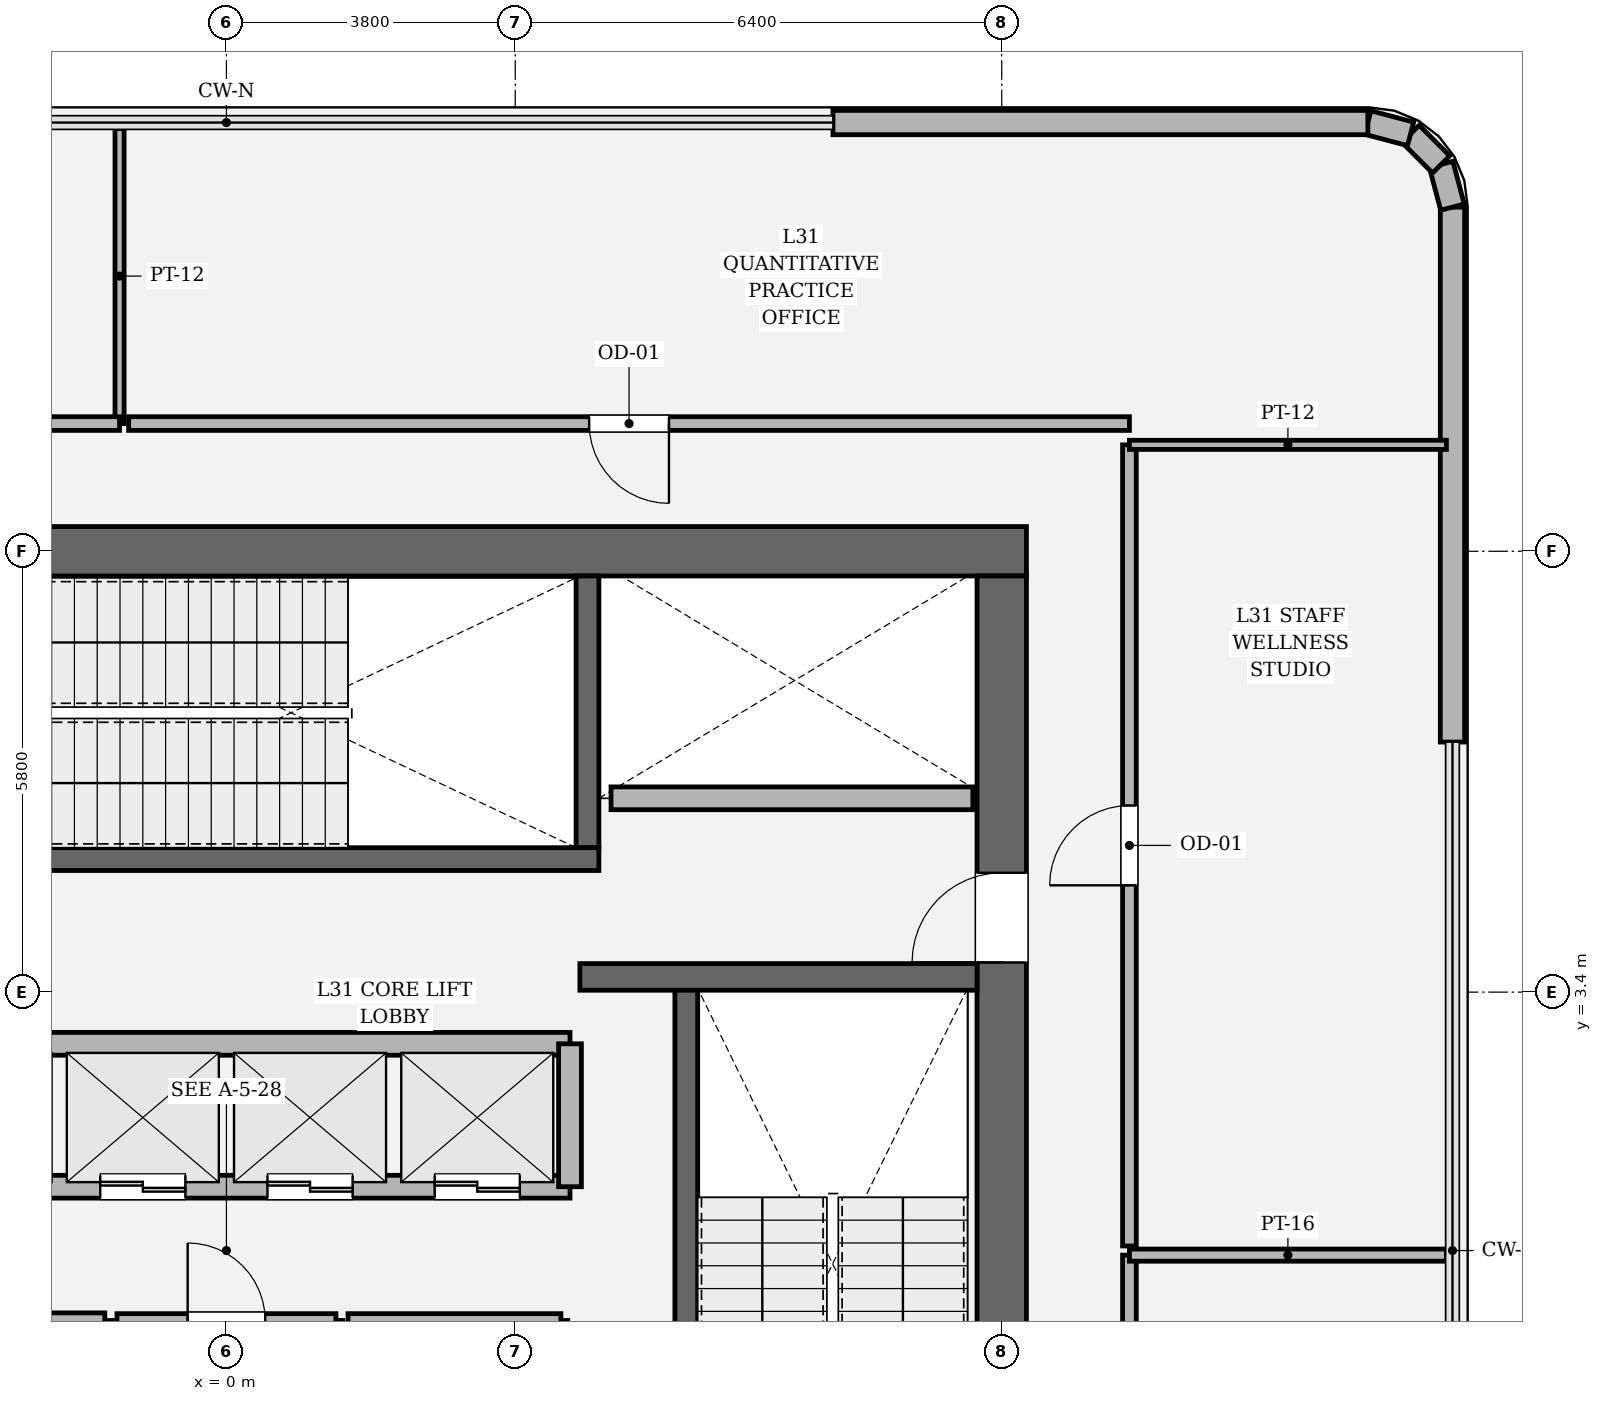
"""IFC4 building model, lengths in metres.
Left out: names, types, materials, properties, quantities, classifications, styles, units other than length and angle.
Written with IfcOpenShell. Run it as: python <this file> out.ifc"""

import sys

from ifc_helpers import new_model, si_unit, direction, frame, frame_2d, origin, place, context, subcontext, project, spatial, rectangle, extrude, element, fill, save


model = new_model("IFC4")
c1 = context("Model", 3, precision=1e-05, world=origin(), true_north=direction((0.0, 1.0)))
c2 = subcontext(c1, "Body", "Model", "MODEL_VIEW")
j1 = project(units=[si_unit("LENGTHUNIT", "METRE"), si_unit("PLANEANGLEUNIT", "RADIAN")], contexts=[c1])
p1 = place(None, origin())
s1 = spatial("IfcSite", under=j1, at=p1, CompositionType="ELEMENT")
p2 = place(p1, origin())
s2 = spatial("IfcBuilding", under=s1, at=p2, CompositionType="ELEMENT")
p3 = place(p2, frame((0.0, 0.0, 135.0)))
s3 = spatial("IfcBuildingStorey", under=s2, at=p3, CompositionType="ELEMENT", Elevation=135.0)
p4 = place(p3, frame((-10.525, 9.2, 0.0), z_axis=(0.0, 0.0, 1.0), x_axis=(1.0, 0.0, 0.0)))
e1 = element("IfcWall", 1, at=p4, inside=s3, PredefinedType="SHEAR", context=c2, shape_type="SweptSolid", body=[
    extrude(rectangle(XDim=21.05, YDim=0.65, at=frame_2d((10.525, 0.0))), origin(), (0.0, 0.0, 1.0), 4.8),
])
p5 = place(p3, frame((10.2, 8.875, 0.0), z_axis=(0.0, 0.0, 1.0), x_axis=(0.0, -1.0, 0.0)))
e2 = element("IfcWall", 2, at=p5, inside=s3, PredefinedType="SHEAR", context=c2, shape_type="SweptSolid", body=[
    extrude(rectangle(XDim=17.75, YDim=0.65, at=frame_2d((8.875, 0.0))), origin(), (0.0, 0.0, 1.0), 4.8),
])
p6 = place(p5, frame((3.905, 0.0, 0.0)))
e3 = element("IfcOpeningElement", 3, at=p6, cuts=e2, PredefinedType="OPENING", context=c2, shape_type="SweptSolid", body=[
    extrude(rectangle(XDim=1.18, YDim=2.2, at=frame_2d((0.59, 1.1))), frame((0.0, 0.335, 0.0), z_axis=(0.0, -1.0, 0.0), x_axis=(1.0, 0.0, 0.0)), (0.0, 0.0, 1.0), 0.67),
])
p7 = place(p3, frame((6.05, 3.45, 0.0), z_axis=(0.0, 0.0, 1.0), x_axis=(0.0, -1.0, 0.0)))
e4 = element("IfcWall", 4, at=p7, inside=s3, PredefinedType="SOLIDWALL", context=c2, shape_type="SweptSolid", body=[
    extrude(rectangle(XDim=8.95, YDim=0.3, at=frame_2d((4.475, 0.0))), origin(), (0.0, 0.0, 1.0), 4.8),
])
p8 = place(p3, frame((4.75, 8.875, 0.0), z_axis=(0.0, 0.0, 1.0), x_axis=(0.0, -1.0, 0.0)))
e5 = element("IfcWall", 5, at=p8, inside=s3, PredefinedType="SOLIDWALL", context=c2, shape_type="SweptSolid", body=[
    extrude(rectangle(XDim=3.575, YDim=0.3, at=frame_2d((1.788, 0.0))), origin(), (0.0, 0.0, 1.0), 4.8),
])
p9 = place(p3, frame((-4.9, 5.15, 0.0), z_axis=(0.0, 0.0, 1.0), x_axis=(1.0, 0.0, 0.0)))
e6 = element("IfcWall", 6, at=p9, inside=s3, PredefinedType="SOLIDWALL", context=c2, shape_type="SweptSolid", body=[
    extrude(rectangle(XDim=9.8, YDim=0.3, at=frame_2d((4.9, 0.0))), origin(), (0.0, 0.0, 1.0), 4.8),
])
p10 = place(p9, frame((0.56, 0.0, 0.0)))
e7 = element("IfcOpeningElement", 7, at=p10, cuts=e6, PredefinedType="OPENING", context=c2, shape_type="SweptSolid", body=[
    extrude(rectangle(XDim=1.18, YDim=2.2, at=frame_2d((0.59, 1.1))), frame((0.0, 0.16, 0.0), z_axis=(0.0, -1.0, 0.0), x_axis=(1.0, 0.0, 0.0)), (0.0, 0.0, 1.0), 0.32),
])
p11 = place(p3, frame((4.65, 3.6, 0.0), z_axis=(0.0, 0.0, 1.0), x_axis=(1.0, 0.0, 0.0)))
e8 = element("IfcWall", 8, at=p11, inside=s3, PredefinedType="SOLIDWALL", context=c2, shape_type="SweptSolid", body=[
    extrude(rectangle(XDim=5.225, YDim=0.35, at=frame_2d((2.613, 0.0))), origin(), (0.0, 0.0, 1.0), 4.8),
])
p12 = place(p3, frame((16.13, 6.69, 0.0), z_axis=(0.0, 0.0, 1.0), x_axis=(0.0, 1.0, 0.0)))
e9 = element("IfcWall", 9, at=p12, inside=s3, PredefinedType="SOLIDWALL", context=c2, shape_type="SweptSolid", body=[
    extrude(rectangle(XDim=7.037, YDim=0.32, at=frame_2d((3.519, 0.0))), origin(), (0.0, 0.0, 1.0), 3.194),
])
p13 = place(p3, frame((16.13, 13.727, 0.0), z_axis=(0.0, 0.0, 1.0), x_axis=(-0.255650250031, 0.966769336325, 0.0)))
e10 = element("IfcWall", 10, at=p13, inside=s3, PredefinedType="SOLIDWALL", context=c2, shape_type="SweptSolid", body=[
    extrude(rectangle(XDim=0.582, YDim=0.32, at=frame_2d((0.291, 0.0))), origin(), (0.0, 0.0, 1.0), 4.52),
])
p14 = place(p3, frame((15.981, 14.289, 0.0), z_axis=(0.0, 0.0, 1.0), x_axis=(-0.707106781187, 0.707106781187, 0.0)))
e11 = element("IfcWall", 11, at=p14, inside=s3, PredefinedType="SOLIDWALL", context=c2, shape_type="SweptSolid", body=[
    extrude(rectangle(XDim=0.569, YDim=0.32, at=frame_2d((0.284, 0.0))), origin(), (0.0, 0.0, 1.0), 4.52),
])
p15 = place(p3, frame((15.579, 14.691, 0.0), z_axis=(0.0, 0.0, 1.0), x_axis=(-0.966665515501, 0.256042537758, 0.0)))
e12 = element("IfcWall", 12, at=p15, inside=s3, PredefinedType="SOLIDWALL", context=c2, shape_type="SweptSolid", body=[
    extrude(rectangle(XDim=0.582, YDim=0.32, at=frame_2d((0.291, 0.0))), origin(), (0.0, 0.0, 1.0), 4.52),
])
p16 = place(p3, frame((15.017, 14.84, 0.0), z_axis=(0.0, 0.0, 1.0), x_axis=(-1.0, 0.0, 0.0)))
e13 = element("IfcWall", 13, at=p16, inside=s3, PredefinedType="SOLIDWALL", context=c2, shape_type="SweptSolid", body=[
    extrude(rectangle(XDim=7.037, YDim=0.32, at=frame_2d((3.519, 0.0))), origin(), (0.0, 0.0, 1.0), 3.194),
])
p17 = place(p3, frame((-4.52, 0.84, 0.0), z_axis=(0.0, 0.0, 1.0), x_axis=(1.0, 0.0, 0.0)))
e14 = element("IfcWall", 14, at=p17, inside=s3, PredefinedType="SOLIDWALL", context=c2, shape_type="SweptSolid", body=[
    extrude(rectangle(XDim=9.04, YDim=0.3, at=frame_2d((4.52, 0.0))), origin(), (0.0, 0.0, 1.0), 4.52),
])
p18 = place(p17, frame((0.66, 0.0, 0.0)))
e15 = element("IfcOpeningElement", 15, at=p18, cuts=e14, PredefinedType="OPENING", context=c2, shape_type="SweptSolid", body=[
    extrude(rectangle(XDim=1.12, YDim=2.25, at=frame_2d((0.56, 1.125))), frame((0.0, 0.16, 0.0), z_axis=(0.0, -1.0, 0.0), x_axis=(1.0, 0.0, 0.0)), (0.0, 0.0, 1.0), 0.32),
])
p19 = place(p17, frame((2.86, 0.0, 0.0)))
e16 = element("IfcOpeningElement", 16, at=p19, cuts=e14, PredefinedType="OPENING", context=c2, shape_type="SweptSolid", body=[
    extrude(rectangle(XDim=1.12, YDim=2.25, at=frame_2d((0.56, 1.125))), frame((0.0, 0.16, 0.0), z_axis=(0.0, -1.0, 0.0), x_axis=(1.0, 0.0, 0.0)), (0.0, 0.0, 1.0), 0.32),
])
p20 = place(p17, frame((5.06, 0.0, 0.0)))
e17 = element("IfcOpeningElement", 17, at=p20, cuts=e14, PredefinedType="OPENING", context=c2, shape_type="SweptSolid", body=[
    extrude(rectangle(XDim=1.12, YDim=2.25, at=frame_2d((0.56, 1.125))), frame((0.0, 0.16, 0.0), z_axis=(0.0, -1.0, 0.0), x_axis=(1.0, 0.0, 0.0)), (0.0, 0.0, 1.0), 0.32),
])
p21 = place(p17, frame((7.26, 0.0, 0.0)))
e18 = element("IfcOpeningElement", 18, at=p21, cuts=e14, PredefinedType="OPENING", context=c2, shape_type="SweptSolid", body=[
    extrude(rectangle(XDim=1.12, YDim=2.25, at=frame_2d((0.56, 1.125))), frame((0.0, 0.16, 0.0), z_axis=(0.0, -1.0, 0.0), x_axis=(1.0, 0.0, 0.0)), (0.0, 0.0, 1.0), 0.32),
])
p22 = place(p3, frame((-4.52, 2.72, 0.0), z_axis=(0.0, 0.0, 1.0), x_axis=(1.0, 0.0, 0.0)))
e19 = element("IfcWall", 19, at=p22, inside=s3, PredefinedType="SOLIDWALL", context=c2, shape_type="SweptSolid", body=[
    extrude(rectangle(XDim=9.04, YDim=0.3, at=frame_2d((4.52, 0.0))), origin(), (0.0, 0.0, 1.0), 4.52),
])
p23 = place(p3, frame((4.52, 0.84, 0.0), z_axis=(0.0, 0.0, 1.0), x_axis=(0.0, 1.0, 0.0)))
e20 = element("IfcWall", 20, at=p23, inside=s3, PredefinedType="SOLIDWALL", context=c2, shape_type="SweptSolid", body=[
    extrude(rectangle(XDim=1.88, YDim=0.3, at=frame_2d((0.94, 0.0))), origin(), (0.0, 0.0, 1.0), 4.52),
])
p24 = place(p3, frame((5.06, 5.95, 0.0), z_axis=(0.0, 0.0, 1.0), x_axis=(1.0, 0.0, 0.0)))
e21 = element("IfcWall", 21, at=p24, inside=s3, PredefinedType="SOLIDWALL", context=c2, shape_type="SweptSolid", body=[
    extrude(rectangle(XDim=4.76, YDim=0.3, at=frame_2d((2.38, 0.0))), origin(), (0.0, 0.0, 1.0), 4.52),
])
p25 = place(p3, frame((-1.6, -2.68, 0.0), z_axis=(0.0, 0.0, 1.0), x_axis=(0.0, 1.0, 0.0)))
e22 = element("IfcWall", 22, at=p25, inside=s3, PredefinedType="SOLIDWALL", context=c2, shape_type="SweptSolid", body=[
    extrude(rectangle(XDim=1.76, YDim=0.2, at=frame_2d((0.88, 0.0))), origin(), (0.0, 0.0, 1.0), 4.52),
])
p26 = place(p3, frame((-1.6, -0.92, 0.0), z_axis=(0.0, 0.0, 1.0), x_axis=(-1.0, 0.0, 0.0)))
e23 = element("IfcWall", 23, at=p26, inside=s3, PredefinedType="SOLIDWALL", context=c2, shape_type="SweptSolid", body=[
    extrude(rectangle(XDim=2.8, YDim=0.2, at=frame_2d((1.4, 0.0))), origin(), (0.0, 0.0, 1.0), 4.52),
])
p27 = place(p26, frame((0.94, 0.0, 0.0)))
e24 = element("IfcOpeningElement", 24, at=p27, cuts=e23, PredefinedType="OPENING", context=c2, shape_type="SweptSolid", body=[
    extrude(rectangle(XDim=0.92, YDim=2.1, at=frame_2d((0.46, 1.05))), frame((0.0, 0.11, 0.0), z_axis=(0.0, -1.0, 0.0), x_axis=(1.0, 0.0, 0.0)), (0.0, 0.0, 1.0), 0.22),
])
p28 = place(p3, frame((1.44, -2.68, 0.0), z_axis=(0.0, 0.0, 1.0), x_axis=(0.0, 1.0, 0.0)))
e25 = element("IfcWall", 25, at=p28, inside=s3, PredefinedType="PARTITIONING", context=c2, shape_type="SweptSolid", body=[
    extrude(rectangle(XDim=1.76, YDim=0.18, at=frame_2d((0.88, 0.0))), origin(), (0.0, 0.0, 1.0), 4.52),
])
p29 = place(p3, frame((1.44, -0.92, 0.0), z_axis=(0.0, 0.0, 1.0), x_axis=(-1.0, 0.0, 0.0)))
e26 = element("IfcWall", 26, at=p29, inside=s3, PredefinedType="PARTITIONING", context=c2, shape_type="SweptSolid", body=[
    extrude(rectangle(XDim=2.88, YDim=0.18, at=frame_2d((1.44, 0.0))), origin(), (0.0, 0.0, 1.0), 4.52),
])
p30 = place(p29, frame((0.93, 0.0, 0.0)))
e27 = element("IfcOpeningElement", 27, at=p30, cuts=e26, PredefinedType="OPENING", context=c2, shape_type="SweptSolid", body=[
    extrude(rectangle(XDim=1.02, YDim=2.2, at=frame_2d((0.51, 1.1))), frame((0.0, 0.1, 0.0), z_axis=(0.0, -1.0, 0.0), x_axis=(1.0, 0.0, 0.0)), (0.0, 0.0, 1.0), 0.2),
])
p31 = place(p3, frame((4.4, -2.68, 0.0), z_axis=(0.0, 0.0, 1.0), x_axis=(0.0, 1.0, 0.0)))
e28 = element("IfcWall", 28, at=p31, inside=s3, PredefinedType="PARTITIONING", context=c2, shape_type="SweptSolid", body=[
    extrude(rectangle(XDim=1.76, YDim=0.18, at=frame_2d((0.88, 0.0))), origin(), (0.0, 0.0, 1.0), 4.52),
])
p32 = place(p31, frame((0.355, 0.0, 0.0)))
e29 = element("IfcOpeningElement", 29, at=p32, cuts=e28, PredefinedType="OPENING", context=c2, shape_type="SweptSolid", body=[
    extrude(rectangle(XDim=1.05, YDim=2.2, at=frame_2d((0.525, 1.1))), frame((0.0, 0.1, 0.0), z_axis=(0.0, -1.0, 0.0), x_axis=(1.0, 0.0, 0.0)), (0.0, 0.0, 1.0), 0.2),
])
p33 = place(p3, frame((4.4, -0.92, 0.0), z_axis=(0.0, 0.0, 1.0), x_axis=(-1.0, 0.0, 0.0)))
e30 = element("IfcWall", 30, at=p33, inside=s3, PredefinedType="PARTITIONING", context=c2, shape_type="SweptSolid", body=[
    extrude(rectangle(XDim=2.8, YDim=0.18, at=frame_2d((1.4, 0.0))), origin(), (0.0, 0.0, 1.0), 4.52),
])
p34 = place(p3, frame((11.88, -10.6, 0.0), z_axis=(0.0, 0.0, 1.0), x_axis=(0.0, 1.0, 0.0)))
e31 = element("IfcWall", 31, at=p34, inside=s3, PredefinedType="PARTITIONING", context=c2, shape_type="SweptSolid", body=[
    extrude(rectangle(XDim=10.54, YDim=0.18, at=frame_2d((5.27, 0.0))), origin(), (0.0, 0.0, 1.0), 3.194),
])
p35 = place(p34, frame((4.745, 0.0, 0.0)))
e32 = element("IfcOpeningElement", 32, at=p35, cuts=e31, PredefinedType="OPENING", context=c2, shape_type="SweptSolid", body=[
    extrude(rectangle(XDim=1.05, YDim=2.2, at=frame_2d((0.525, 1.1))), frame((0.0, 0.1, 0.0), z_axis=(0.0, -1.0, 0.0), x_axis=(1.0, 0.0, 0.0)), (0.0, 0.0, 1.0), 0.2),
])
p36 = place(p3, frame((11.88, -0.06, 0.0), z_axis=(0.0, 0.0, 1.0), x_axis=(1.0, 0.0, 0.0)))
e33 = element("IfcWall", 33, at=p36, inside=s3, PredefinedType="PARTITIONING", context=c2, shape_type="SweptSolid", body=[
    extrude(rectangle(XDim=4.17, YDim=0.16, at=frame_2d((2.085, 0.0))), origin(), (0.0, 0.0, 1.0), 4.52),
])
p37 = place(p3, frame((11.88, 0.06, 0.0), z_axis=(0.0, 0.0, 1.0), x_axis=(0.0, 1.0, 0.0)))
e34 = element("IfcWall", 34, at=p37, inside=s3, PredefinedType="PARTITIONING", context=c2, shape_type="SweptSolid", body=[
    extrude(rectangle(XDim=10.54, YDim=0.18, at=frame_2d((5.27, 0.0))), origin(), (0.0, 0.0, 1.0), 3.194),
])
p38 = place(p37, frame((4.745, 0.0, 0.0)))
e35 = element("IfcOpeningElement", 35, at=p38, cuts=e34, PredefinedType="OPENING", context=c2, shape_type="SweptSolid", body=[
    extrude(rectangle(XDim=1.05, YDim=2.2, at=frame_2d((0.525, 1.1))), frame((0.0, 0.1, 0.0), z_axis=(0.0, -1.0, 0.0), x_axis=(1.0, 0.0, 0.0)), (0.0, 0.0, 1.0), 0.2),
])
p39 = place(p3, frame((11.88, 10.6, 0.0), z_axis=(0.0, 0.0, 1.0), x_axis=(1.0, 0.0, 0.0)))
e36 = element("IfcWall", 36, at=p39, inside=s3, PredefinedType="PARTITIONING", context=c2, shape_type="SweptSolid", body=[
    extrude(rectangle(XDim=4.17, YDim=0.12, at=frame_2d((2.085, 0.0))), origin(), (0.0, 0.0, 1.0), 4.114),
])
p40 = place(p3, frame((-1.406, 14.76, 0.0), z_axis=(0.0, 0.0, 1.0), x_axis=(0.0, -1.0, 0.0)))
e37 = element("IfcWall", 37, at=p40, inside=s3, PredefinedType="PARTITIONING", context=c2, shape_type="SweptSolid", body=[
    extrude(rectangle(XDim=3.88, YDim=0.12, at=frame_2d((1.94, 0.0))), origin(), (0.0, 0.0, 1.0), 4.52),
])
p41 = place(p3, frame((-1.406, 10.88, 0.0), z_axis=(0.0, 0.0, 1.0), x_axis=(-1.0, 0.0, 0.0)))
e38 = element("IfcWall", 38, at=p41, inside=s3, PredefinedType="PARTITIONING", context=c2, shape_type="SweptSolid", body=[
    extrude(rectangle(XDim=10.474, YDim=0.18, at=frame_2d((5.237, 0.0))), origin(), (0.0, 0.0, 1.0), 3.194),
])
p42 = place(p41, frame((4.712, 0.0, 0.0)))
e39 = element("IfcOpeningElement", 39, at=p42, cuts=e38, PredefinedType="OPENING", context=c2, shape_type="SweptSolid", body=[
    extrude(rectangle(XDim=1.05, YDim=2.2, at=frame_2d((0.525, 1.1))), frame((0.0, 0.1, 0.0), z_axis=(0.0, -1.0, 0.0), x_axis=(1.0, 0.0, 0.0)), (0.0, 0.0, 1.0), 0.2),
])
p43 = place(p3, frame((11.88, 10.88, 0.0), z_axis=(0.0, 0.0, 1.0), x_axis=(-1.0, 0.0, 0.0)))
e40 = element("IfcWall", 40, at=p43, inside=s3, PredefinedType="PARTITIONING", context=c2, shape_type="SweptSolid", body=[
    extrude(rectangle(XDim=13.166, YDim=0.18, at=frame_2d((6.583, 0.0))), origin(), (0.0, 0.0, 1.0), 3.194),
])
p44 = place(p43, frame((6.058, 0.0, 0.0)))
e41 = element("IfcOpeningElement", 41, at=p44, cuts=e40, PredefinedType="OPENING", context=c2, shape_type="SweptSolid", body=[
    extrude(rectangle(XDim=1.05, YDim=2.2, at=frame_2d((0.525, 1.1))), frame((0.0, 0.1, 0.0), z_axis=(0.0, -1.0, 0.0), x_axis=(1.0, 0.0, 0.0)), (0.0, 0.0, 1.0), 0.2),
])
p45 = place(p6, origin())
e42 = element("IfcDoor", 42, at=p45, inside=s3, OperationType="SINGLE_SWING_RIGHT", PredefinedType="DOOR", context=c2, shape_type="SweptSolid", body=[
    extrude(rectangle(XDim=1.18, YDim=2.2, at=frame_2d((0.59, 1.1))), frame((0.0, 0.025, 0.0), z_axis=(0.0, -1.0, 0.0), x_axis=(1.0, 0.0, 0.0)), (0.0, 0.0, 1.0), 0.05),
])
fill(e3, e42)
p46 = place(p19, origin())
e43 = element("IfcDoor", 43, at=p46, inside=s3, OperationType="DOUBLE_DOOR_SLIDING", PredefinedType="DOOR", context=c2, shape_type="SweptSolid", body=[
    extrude(rectangle(XDim=1.12, YDim=2.25, at=frame_2d((0.56, 1.125))), frame((0.0, 0.025, 0.0), z_axis=(0.0, -1.0, 0.0), x_axis=(1.0, 0.0, 0.0)), (0.0, 0.0, 1.0), 0.05),
])
fill(e16, e43)
p47 = place(p20, origin())
e44 = element("IfcDoor", 44, at=p47, inside=s3, OperationType="DOUBLE_DOOR_SLIDING", PredefinedType="DOOR", context=c2, shape_type="SweptSolid", body=[
    extrude(rectangle(XDim=1.12, YDim=2.25, at=frame_2d((0.56, 1.125))), frame((0.0, 0.025, 0.0), z_axis=(0.0, -1.0, 0.0), x_axis=(1.0, 0.0, 0.0)), (0.0, 0.0, 1.0), 0.05),
])
fill(e17, e44)
p48 = place(p21, origin())
e45 = element("IfcDoor", 45, at=p48, inside=s3, OperationType="DOUBLE_DOOR_SLIDING", PredefinedType="DOOR", context=c2, shape_type="SweptSolid", body=[
    extrude(rectangle(XDim=1.12, YDim=2.25, at=frame_2d((0.56, 1.125))), frame((0.0, 0.025, 0.0), z_axis=(0.0, -1.0, 0.0), x_axis=(1.0, 0.0, 0.0)), (0.0, 0.0, 1.0), 0.05),
])
fill(e18, e45)
p49 = place(p30, origin())
e46 = element("IfcDoor", 46, at=p49, inside=s3, OperationType="SINGLE_SWING_RIGHT", PredefinedType="DOOR", context=c2, shape_type="SweptSolid", body=[
    extrude(rectangle(XDim=1.02, YDim=2.2, at=frame_2d((0.51, 1.1))), frame((0.0, 0.025, 0.0), z_axis=(0.0, -1.0, 0.0), x_axis=(1.0, 0.0, 0.0)), (0.0, 0.0, 1.0), 0.05),
])
fill(e27, e46)
p50 = place(p38, origin())
e47 = element("IfcDoor", 47, at=p50, inside=s3, OperationType="SINGLE_SWING_LEFT", PredefinedType="DOOR", context=c2, shape_type="SweptSolid", body=[
    extrude(rectangle(XDim=1.05, YDim=2.2, at=frame_2d((0.525, 1.1))), frame((0.0, 0.025, 0.0), z_axis=(0.0, -1.0, 0.0), x_axis=(1.0, 0.0, 0.0)), (0.0, 0.0, 1.0), 0.05),
])
fill(e35, e47)
p51 = place(p44, origin())
e48 = element("IfcDoor", 48, at=p51, inside=s3, OperationType="SINGLE_SWING_LEFT", PredefinedType="DOOR", context=c2, shape_type="SweptSolid", body=[
    extrude(rectangle(XDim=1.05, YDim=2.2, at=frame_2d((0.525, 1.1))), frame((0.0, 0.025, 0.0), z_axis=(0.0, -1.0, 0.0), x_axis=(1.0, 0.0, 0.0)), (0.0, 0.0, 1.0), 0.05),
])
fill(e41, e48)
save(model, sys.argv[1])
